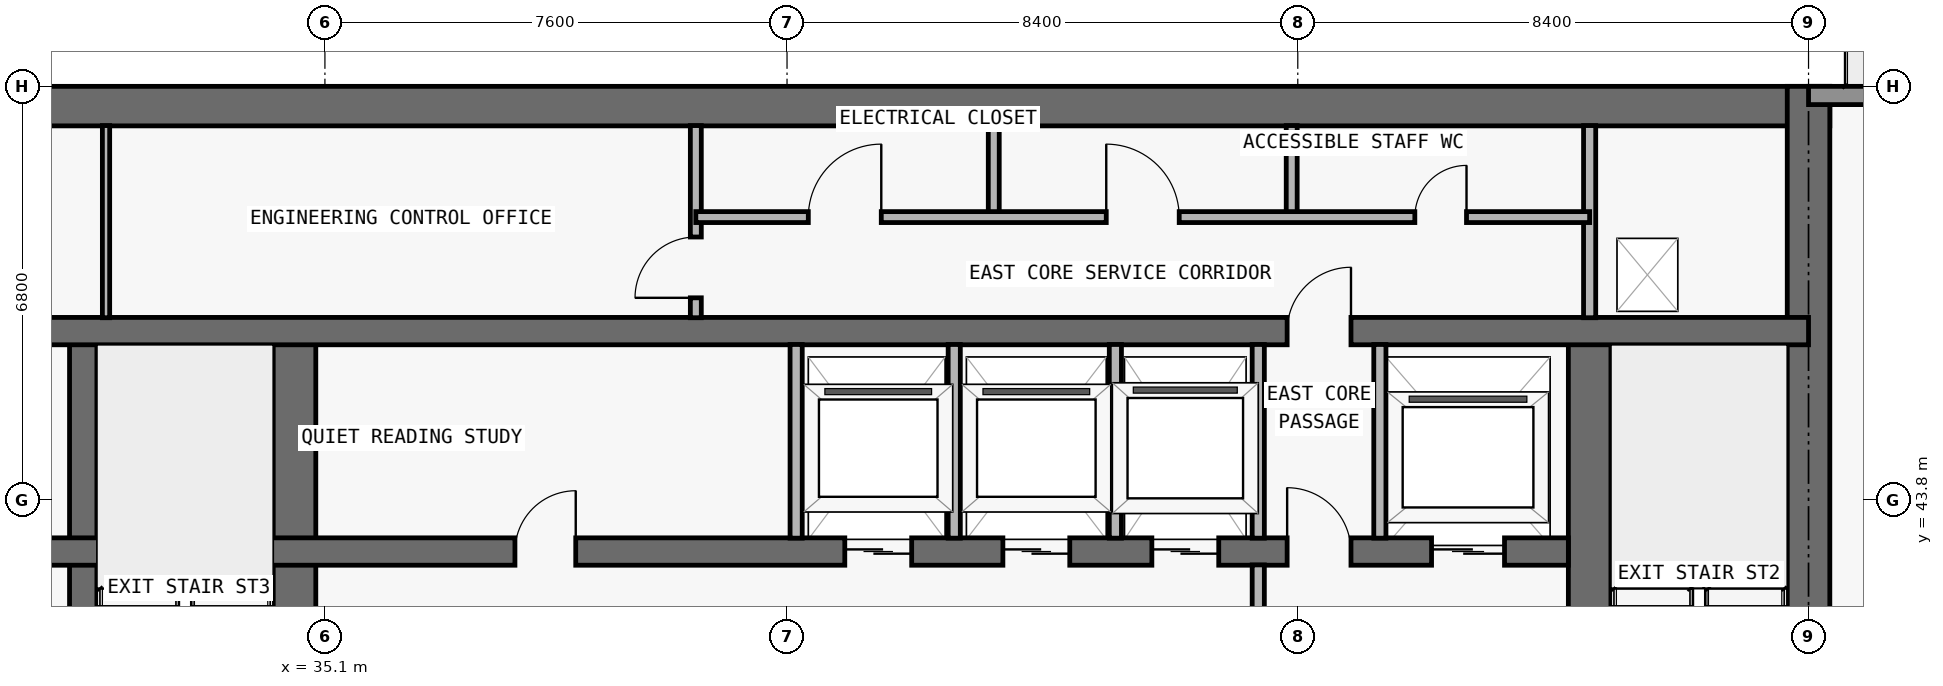
"""IFC4 building model, lengths in metres.
Left out: names, types, materials, properties, quantities, classifications, styles, units other than length and angle.
Written with IfcOpenShell. Run it as: python <this file> out.ifc"""

import sys

from ifc_helpers import new_model, si_unit, direction, frame, frame_2d, origin, place, context, subcontext, project, spatial, rectangle, extrude, element, fill, save


model = new_model("IFC4")
c1 = context("Model", 3, precision=1e-05, world=origin(), true_north=direction((0.0, 1.0)))
c2 = subcontext(c1, "Body", "Model", "MODEL_VIEW")
j1 = project(units=[si_unit("LENGTHUNIT", "METRE"), si_unit("PLANEANGLEUNIT", "RADIAN")], contexts=[c1])
p1 = place(None, origin())
s1 = spatial("IfcSite", under=j1, at=p1, CompositionType="ELEMENT")
p2 = place(p1, origin())
s2 = spatial("IfcBuilding", under=s1, at=p2, CompositionType="ELEMENT")
p3 = place(p2, frame((0.0, 0.0, 183.6)))
s3 = spatial("IfcBuildingStorey", under=s2, at=p3, CompositionType="ELEMENT", Elevation=183.6)
p4 = place(p3, frame((17.95, 50.275, 0.0), z_axis=(0.0, 0.0, 1.0), x_axis=(1.0, 0.0, 0.0)))
e1 = element("IfcWall", 1, at=p4, inside=s3, PredefinedType="SHEAR", context=c2, shape_type="SweptSolid", body=[
    extrude(rectangle(XDim=41.9, YDim=0.65, at=frame_2d((20.95, 0.0))), origin(), (0.0, 0.0, 1.0), 4.55),
])
p5 = place(p3, frame((59.5, 36.65, 0.0), z_axis=(0.0, 0.0, 1.0), x_axis=(0.0, 1.0, 0.0)))
e2 = element("IfcWall", 2, at=p5, inside=s3, PredefinedType="SHEAR", context=c2, shape_type="SweptSolid", body=[
    extrude(rectangle(XDim=13.95, YDim=0.7, at=frame_2d((6.975, 0.0))), origin(), (0.0, 0.0, 1.0), 4.55),
])
p6 = place(p3, frame((55.9, 37.0, 0.0), z_axis=(0.0, 0.0, 1.0), x_axis=(0.0, 1.0, 0.0)))
e3 = element("IfcWall", 3, at=p6, inside=s3, PredefinedType="SHEAR", context=c2, shape_type="SweptSolid", body=[
    extrude(rectangle(XDim=9.575, YDim=0.7, at=frame_2d((4.788, 0.0))), origin(), (0.0, 0.0, 1.0), 4.55),
])
p7 = place(p6, frame((0.55, 0.0, 0.0)))
e4 = element("IfcOpeningElement", 4, at=p7, cuts=e3, PredefinedType="OPENING", context=c2, shape_type="SweptSolid", body=[
    extrude(rectangle(XDim=1.1, YDim=2.15, at=frame_2d((0.55, 1.075))), frame((0.0, 0.36, 0.0), z_axis=(0.0, -1.0, 0.0), x_axis=(1.0, 0.0, 0.0)), (0.0, 0.0, 1.0), 0.72),
])
p8 = place(p3, frame((31.125, 37.0, 0.0), z_axis=(0.0, 0.0, 1.0), x_axis=(0.0, 1.0, 0.0)))
e5 = element("IfcWall", 5, at=p8, inside=s3, PredefinedType="SHEAR", context=c2, shape_type="SweptSolid", body=[
    extrude(rectangle(XDim=9.575, YDim=0.45, at=frame_2d((4.788, 0.0))), origin(), (0.0, 0.0, 1.0), 4.55),
])
p9 = place(p3, frame((34.6, 37.0, 0.0), z_axis=(0.0, 0.0, 1.0), x_axis=(0.0, 1.0, 0.0)))
e6 = element("IfcWall", 6, at=p9, inside=s3, PredefinedType="SHEAR", context=c2, shape_type="SweptSolid", body=[
    extrude(rectangle(XDim=9.575, YDim=0.7, at=frame_2d((4.788, 0.0))), origin(), (0.0, 0.0, 1.0), 4.55),
])
p10 = place(p3, frame((22.25, 42.95, 0.0), z_axis=(0.0, 0.0, 1.0), x_axis=(1.0, 0.0, 0.0)))
e7 = element("IfcWall", 7, at=p10, inside=s3, PredefinedType="SHEAR", context=c2, shape_type="SweptSolid", body=[
    extrude(rectangle(XDim=33.3, YDim=0.45, at=frame_2d((16.65, 0.0))), origin(), (0.0, 0.0, 1.0), 4.55),
])
p11 = place(p10, frame((1.05, 0.0, 0.0)))
e8 = element("IfcOpeningElement", 8, at=p11, cuts=e7, PredefinedType="OPENING", context=c2, shape_type="SweptSolid", body=[
    extrude(rectangle(XDim=1.2, YDim=2.2, at=frame_2d((0.6, 1.1))), frame((0.0, 0.235, 0.0), z_axis=(0.0, -1.0, 0.0), x_axis=(1.0, 0.0, 0.0)), (0.0, 0.0, 1.0), 0.47),
])
p12 = place(p10, frame((31.05, 0.0, 0.0)))
e9 = element("IfcOpeningElement", 9, at=p12, cuts=e7, PredefinedType="OPENING", context=c2, shape_type="SweptSolid", body=[
    extrude(rectangle(XDim=1.2, YDim=2.2, at=frame_2d((0.6, 1.1))), frame((0.0, 0.235, 0.0), z_axis=(0.0, -1.0, 0.0), x_axis=(1.0, 0.0, 0.0)), (0.0, 0.0, 1.0), 0.47),
])
p13 = place(p10, frame((21.4, 0.0, 0.0)))
e10 = element("IfcOpeningElement", 10, at=p13, cuts=e7, PredefinedType="OPENING", context=c2, shape_type="SweptSolid", body=[
    extrude(rectangle(XDim=1.1, YDim=2.2, at=frame_2d((0.55, 1.1))), frame((0.0, 0.235, 0.0), z_axis=(0.0, -1.0, 0.0), x_axis=(1.0, 0.0, 0.0)), (0.0, 0.0, 1.0), 0.47),
])
p14 = place(p10, frame((24.0, 0.0, 0.0)))
e11 = element("IfcOpeningElement", 11, at=p14, cuts=e7, PredefinedType="OPENING", context=c2, shape_type="SweptSolid", body=[
    extrude(rectangle(XDim=1.1, YDim=2.2, at=frame_2d((0.55, 1.1))), frame((0.0, 0.235, 0.0), z_axis=(0.0, -1.0, 0.0), x_axis=(1.0, 0.0, 0.0)), (0.0, 0.0, 1.0), 0.47),
])
p15 = place(p10, frame((26.45, 0.0, 0.0)))
e12 = element("IfcOpeningElement", 12, at=p15, cuts=e7, PredefinedType="OPENING", context=c2, shape_type="SweptSolid", body=[
    extrude(rectangle(XDim=1.1, YDim=2.2, at=frame_2d((0.55, 1.1))), frame((0.0, 0.235, 0.0), z_axis=(0.0, -1.0, 0.0), x_axis=(1.0, 0.0, 0.0)), (0.0, 0.0, 1.0), 0.47),
])
p16 = place(p10, frame((5.95, 0.0, 0.0)))
e13 = element("IfcOpeningElement", 13, at=p16, cuts=e7, PredefinedType="OPENING", context=c2, shape_type="SweptSolid", body=[
    extrude(rectangle(XDim=1.1, YDim=2.2, at=frame_2d((0.55, 1.1))), frame((0.0, 0.235, 0.0), z_axis=(0.0, -1.0, 0.0), x_axis=(1.0, 0.0, 0.0)), (0.0, 0.0, 1.0), 0.47),
])
p17 = place(p10, frame((3.625, 0.0, 0.0)))
e14 = element("IfcOpeningElement", 14, at=p17, cuts=e7, PredefinedType="OPENING", context=c2, shape_type="SweptSolid", body=[
    extrude(rectangle(XDim=1.05, YDim=2.15, at=frame_2d((0.525, 1.075))), frame((0.0, 0.235, 0.0), z_axis=(0.0, -1.0, 0.0), x_axis=(1.0, 0.0, 0.0)), (0.0, 0.0, 1.0), 0.47),
])
p18 = place(p10, frame((28.675, 0.0, 0.0)))
e15 = element("IfcOpeningElement", 15, at=p18, cuts=e7, PredefinedType="OPENING", context=c2, shape_type="SweptSolid", body=[
    extrude(rectangle(XDim=1.05, YDim=2.15, at=frame_2d((0.525, 1.075))), frame((0.0, 0.235, 0.0), z_axis=(0.0, -1.0, 0.0), x_axis=(1.0, 0.0, 0.0)), (0.0, 0.0, 1.0), 0.47),
])
p19 = place(p10, frame((15.975, 0.0, 0.0)))
e16 = element("IfcOpeningElement", 16, at=p19, cuts=e7, PredefinedType="OPENING", context=c2, shape_type="SweptSolid", body=[
    extrude(rectangle(XDim=1.0, YDim=2.2, at=frame_2d((0.5, 1.1))), frame((0.0, 0.235, 0.0), z_axis=(0.0, -1.0, 0.0), x_axis=(1.0, 0.0, 0.0)), (0.0, 0.0, 1.0), 0.47),
])
p20 = place(p3, frame((18.3, 46.575, 0.0), z_axis=(0.0, 0.0, 1.0), x_axis=(1.0, 0.0, 0.0)))
e17 = element("IfcWall", 17, at=p20, inside=s3, PredefinedType="SHEAR", context=c2, shape_type="SweptSolid", body=[
    extrude(rectangle(XDim=41.2, YDim=0.45, at=frame_2d((20.6, 0.0))), origin(), (0.0, 0.0, 1.0), 4.55),
])
p21 = place(p20, frame((7.6, 0.0, 0.0)))
e18 = element("IfcOpeningElement", 18, at=p21, cuts=e17, PredefinedType="OPENING", context=c2, shape_type="SweptSolid", body=[
    extrude(rectangle(XDim=1.0, YDim=2.2, at=frame_2d((0.5, 1.1))), frame((0.0, 0.235, 0.0), z_axis=(0.0, -1.0, 0.0), x_axis=(1.0, 0.0, 0.0)), (0.0, 0.0, 1.0), 0.47),
])
p22 = place(p20, frame((32.625, 0.0, 0.0)))
e19 = element("IfcOpeningElement", 19, at=p22, cuts=e17, PredefinedType="OPENING", context=c2, shape_type="SweptSolid", body=[
    extrude(rectangle(XDim=1.05, YDim=2.15, at=frame_2d((0.525, 1.075))), frame((0.0, 0.235, 0.0), z_axis=(0.0, -1.0, 0.0), x_axis=(1.0, 0.0, 0.0)), (0.0, 0.0, 1.0), 0.47),
])
p23 = place(p3, frame((59.5, 50.45, 0.0), z_axis=(0.0, 0.0, 1.0), x_axis=(1.0, 0.0, 0.0)))
e20 = element("IfcWall", 20, at=p23, inside=s3, PredefinedType="STANDARD", context=c2, shape_type="SweptSolid", body=[
    extrude(rectangle(XDim=8.2, YDim=0.3, at=frame_2d((4.1, 0.0))), origin(), (0.0, 0.0, 1.0), 4.55),
])
p24 = place(p23, frame((3.1, 0.0, 0.0)))
e21 = element("IfcOpeningElement", 21, at=p24, cuts=e20, PredefinedType="OPENING", context=c2, shape_type="SweptSolid", body=[
    extrude(rectangle(XDim=2.0, YDim=2.3, at=frame_2d((1.0, 1.15))), frame((0.0, 0.16, 0.0), z_axis=(0.0, -1.0, 0.0), x_axis=(1.0, 0.0, 0.0)), (0.0, 0.0, 1.0), 0.32),
])
p25 = place(p3, frame((31.5, 46.795, 0.0), z_axis=(0.0, 0.0, 1.0), x_axis=(0.0, 1.0, 0.0)))
e22 = element("IfcWall", 22, at=p25, inside=s3, PredefinedType="PARTITIONING", context=c2, shape_type="SweptSolid", body=[
    extrude(rectangle(XDim=3.16, YDim=0.12, at=frame_2d((1.58, 0.0))), origin(), (0.0, 0.0, 1.0), 4.55),
])
p26 = place(p3, frame((41.2, 46.795, 0.0), z_axis=(0.0, 0.0, 1.0), x_axis=(0.0, 1.0, 0.0)))
e23 = element("IfcWall", 23, at=p26, inside=s3, PredefinedType="PARTITIONING", context=c2, shape_type="SweptSolid", body=[
    extrude(rectangle(XDim=3.16, YDim=0.18, at=frame_2d((1.58, 0.0))), origin(), (0.0, 0.0, 1.0), 4.55),
])
p27 = place(p26, frame((0.327, 0.0, 0.0)))
e24 = element("IfcOpeningElement", 24, at=p27, cuts=e23, PredefinedType="OPENING", context=c2, shape_type="SweptSolid", body=[
    extrude(rectangle(XDim=1.0, YDim=2.2, at=frame_2d((0.5, 1.1))), frame((0.0, 0.1, 0.0), z_axis=(0.0, -1.0, 0.0), x_axis=(1.0, 0.0, 0.0)), (0.0, 0.0, 1.0), 0.2),
])
for number, where, z_axis, x_axis in (
    (25, (42.85, 43.17, 0.0), (0.0, 0.0, 1.0), (0.0, 1.0, 0.0)),
    (26, (45.45, 43.17, 0.0), (0.0, 0.0, 1.0), (0.0, 1.0, 0.0)),
):
    element("IfcWall", number, at=place(p3, frame(where, z_axis=z_axis, x_axis=x_axis)), inside=s3, PredefinedType="PARTITIONING", context=c2, shape_type="SweptSolid", body=[
        extrude(rectangle(XDim=3.185, YDim=0.2, at=frame_2d((1.593, 0.0))), origin(), (0.0, 0.0, 1.0), 4.55),
    ])
p28 = place(p3, frame((46.1, 48.45, 0.0), z_axis=(0.0, 0.0, 1.0), x_axis=(0.0, 1.0, 0.0)))
e27 = element("IfcWall", 27, at=p28, inside=s3, PredefinedType="PARTITIONING", context=c2, shape_type="SweptSolid", body=[
    extrude(rectangle(XDim=1.505, YDim=0.18, at=frame_2d((0.752, 0.0))), origin(), (0.0, 0.0, 1.0), 4.55),
])
p29 = place(p3, frame((48.1, 43.17, 0.0), z_axis=(0.0, 0.0, 1.0), x_axis=(0.0, 1.0, 0.0)))
e28 = element("IfcWall", 28, at=p29, inside=s3, PredefinedType="PARTITIONING", context=c2, shape_type="SweptSolid", body=[
    extrude(rectangle(XDim=3.185, YDim=0.2, at=frame_2d((1.593, 0.0))), origin(), (0.0, 0.0, 1.0), 4.55),
])
p30 = place(p3, frame((50.45, 37.345, 0.0), z_axis=(0.0, 0.0, 1.0), x_axis=(0.0, 1.0, 0.0)))
e29 = element("IfcWall", 29, at=p30, inside=s3, PredefinedType="PARTITIONING", context=c2, shape_type="SweptSolid", body=[
    extrude(rectangle(XDim=5.385, YDim=0.2, at=frame_2d((2.692, 0.0))), origin(), (0.0, 0.0, 1.0), 4.55),
])
p31 = place(p3, frame((50.45, 43.17, 0.0), z_axis=(0.0, 0.0, 1.0), x_axis=(0.0, 1.0, 0.0)))
e30 = element("IfcWall", 30, at=p31, inside=s3, PredefinedType="PARTITIONING", context=c2, shape_type="SweptSolid", body=[
    extrude(rectangle(XDim=3.185, YDim=0.2, at=frame_2d((1.593, 0.0))), origin(), (0.0, 0.0, 1.0), 4.55),
])
p32 = place(p3, frame((51.0, 48.45, 0.0), z_axis=(0.0, 0.0, 1.0), x_axis=(0.0, 1.0, 0.0)))
e31 = element("IfcWall", 31, at=p32, inside=s3, PredefinedType="PARTITIONING", context=c2, shape_type="SweptSolid", body=[
    extrude(rectangle(XDim=1.505, YDim=0.18, at=frame_2d((0.752, 0.0))), origin(), (0.0, 0.0, 1.0), 4.55),
])
p33 = place(p3, frame((52.45, 43.17, 0.0), z_axis=(0.0, 0.0, 1.0), x_axis=(0.0, 1.0, 0.0)))
e32 = element("IfcWall", 32, at=p33, inside=s3, PredefinedType="PARTITIONING", context=c2, shape_type="SweptSolid", body=[
    extrude(rectangle(XDim=3.185, YDim=0.2, at=frame_2d((1.593, 0.0))), origin(), (0.0, 0.0, 1.0), 4.55),
])
p34 = place(p3, frame((55.9, 46.795, 0.0), z_axis=(0.0, 0.0, 1.0), x_axis=(0.0, 1.0, 0.0)))
e33 = element("IfcWall", 33, at=p34, inside=s3, PredefinedType="PARTITIONING", context=c2, shape_type="SweptSolid", body=[
    extrude(rectangle(XDim=3.16, YDim=0.2, at=frame_2d((1.58, 0.0))), origin(), (0.0, 0.0, 1.0), 4.55),
])
p35 = place(p3, frame((41.2, 48.45, 0.0), z_axis=(0.0, 0.0, 1.0), x_axis=(1.0, 0.0, 0.0)))
e34 = element("IfcWall", 34, at=p35, inside=s3, PredefinedType="PARTITIONING", context=c2, shape_type="SweptSolid", body=[
    extrude(rectangle(XDim=14.7, YDim=0.18, at=frame_2d((7.35, 0.0))), origin(), (0.0, 0.0, 1.0), 4.55),
])
p36 = place(p35, frame((1.85, 0.0, 0.0)))
e35 = element("IfcOpeningElement", 35, at=p36, cuts=e34, PredefinedType="OPENING", context=c2, shape_type="SweptSolid", body=[
    extrude(rectangle(XDim=1.2, YDim=2.2, at=frame_2d((0.6, 1.1))), frame((0.0, 0.1, 0.0), z_axis=(0.0, -1.0, 0.0), x_axis=(1.0, 0.0, 0.0)), (0.0, 0.0, 1.0), 0.2),
])
p37 = place(p35, frame((6.75, 0.0, 0.0)))
e36 = element("IfcOpeningElement", 36, at=p37, cuts=e34, PredefinedType="OPENING", context=c2, shape_type="SweptSolid", body=[
    extrude(rectangle(XDim=1.2, YDim=2.2, at=frame_2d((0.6, 1.1))), frame((0.0, 0.1, 0.0), z_axis=(0.0, -1.0, 0.0), x_axis=(1.0, 0.0, 0.0)), (0.0, 0.0, 1.0), 0.2),
])
p38 = place(p35, frame((11.825, 0.0, 0.0)))
e37 = element("IfcOpeningElement", 37, at=p38, cuts=e34, PredefinedType="OPENING", context=c2, shape_type="SweptSolid", body=[
    extrude(rectangle(XDim=0.85, YDim=2.1, at=frame_2d((0.425, 1.05))), frame((0.0, 0.1, 0.0), z_axis=(0.0, -1.0, 0.0), x_axis=(1.0, 0.0, 0.0)), (0.0, 0.0, 1.0), 0.2),
])
p39 = place(p12, origin())
e38 = element("IfcDoor", 38, at=p39, inside=s3, OperationType="DOUBLE_DOOR_SLIDING", PredefinedType="DOOR", context=c2, shape_type="SweptSolid", body=[
    extrude(rectangle(XDim=1.2, YDim=2.2, at=frame_2d((0.6, 1.1))), frame((0.0, 0.025, 0.0), z_axis=(0.0, -1.0, 0.0), x_axis=(1.0, 0.0, 0.0)), (0.0, 0.0, 1.0), 0.05),
])
fill(e9, e38)
p40 = place(p13, origin())
e39 = element("IfcDoor", 39, at=p40, inside=s3, OperationType="DOUBLE_DOOR_SLIDING", PredefinedType="DOOR", context=c2, shape_type="SweptSolid", body=[
    extrude(rectangle(XDim=1.1, YDim=2.2, at=frame_2d((0.55, 1.1))), frame((0.0, 0.025, 0.0), z_axis=(0.0, -1.0, 0.0), x_axis=(1.0, 0.0, 0.0)), (0.0, 0.0, 1.0), 0.05),
])
fill(e10, e39)
p41 = place(p14, origin())
e40 = element("IfcDoor", 40, at=p41, inside=s3, OperationType="DOUBLE_DOOR_SLIDING", PredefinedType="DOOR", context=c2, shape_type="SweptSolid", body=[
    extrude(rectangle(XDim=1.1, YDim=2.2, at=frame_2d((0.55, 1.1))), frame((0.0, 0.025, 0.0), z_axis=(0.0, -1.0, 0.0), x_axis=(1.0, 0.0, 0.0)), (0.0, 0.0, 1.0), 0.05),
])
fill(e11, e40)
p42 = place(p15, origin())
e41 = element("IfcDoor", 41, at=p42, inside=s3, OperationType="DOUBLE_DOOR_SLIDING", PredefinedType="DOOR", context=c2, shape_type="SweptSolid", body=[
    extrude(rectangle(XDim=1.1, YDim=2.2, at=frame_2d((0.55, 1.1))), frame((0.0, 0.025, 0.0), z_axis=(0.0, -1.0, 0.0), x_axis=(1.0, 0.0, 0.0)), (0.0, 0.0, 1.0), 0.05),
])
fill(e12, e41)
p43 = place(p18, origin())
e42 = element("IfcDoor", 42, at=p43, inside=s3, OperationType="SINGLE_SWING_LEFT", PredefinedType="DOOR", context=c2, shape_type="SweptSolid", body=[
    extrude(rectangle(XDim=1.05, YDim=2.15, at=frame_2d((0.525, 1.075))), frame((0.0, 0.025, 0.0), z_axis=(0.0, -1.0, 0.0), x_axis=(1.0, 0.0, 0.0)), (0.0, 0.0, 1.0), 0.05),
])
fill(e15, e42)
p44 = place(p19, origin())
e43 = element("IfcDoor", 43, at=p44, inside=s3, OperationType="SINGLE_SWING_RIGHT", PredefinedType="DOOR", context=c2, shape_type="SweptSolid", body=[
    extrude(rectangle(XDim=1.0, YDim=2.2, at=frame_2d((0.5, 1.1))), frame((0.0, 0.025, 0.0), z_axis=(0.0, -1.0, 0.0), x_axis=(1.0, 0.0, 0.0)), (0.0, 0.0, 1.0), 0.05),
])
fill(e16, e43)
p45 = place(p22, origin())
e44 = element("IfcDoor", 44, at=p45, inside=s3, OperationType="SINGLE_SWING_RIGHT", PredefinedType="DOOR", context=c2, shape_type="SweptSolid", body=[
    extrude(rectangle(XDim=1.05, YDim=2.15, at=frame_2d((0.525, 1.075))), frame((0.0, 0.025, 0.0), z_axis=(0.0, -1.0, 0.0), x_axis=(1.0, 0.0, 0.0)), (0.0, 0.0, 1.0), 0.05),
])
fill(e19, e44)
p46 = place(p27, origin())
e45 = element("IfcDoor", 45, at=p46, inside=s3, OperationType="SINGLE_SWING_LEFT", PredefinedType="DOOR", context=c2, shape_type="SweptSolid", body=[
    extrude(rectangle(XDim=1.0, YDim=2.2, at=frame_2d((0.5, 1.1))), frame((0.0, 0.025, 0.0), z_axis=(0.0, -1.0, 0.0), x_axis=(1.0, 0.0, 0.0)), (0.0, 0.0, 1.0), 0.05),
])
fill(e24, e45)
p47 = place(p36, origin())
e46 = element("IfcDoor", 46, at=p47, inside=s3, OperationType="SINGLE_SWING_RIGHT", PredefinedType="DOOR", context=c2, shape_type="SweptSolid", body=[
    extrude(rectangle(XDim=1.2, YDim=2.2, at=frame_2d((0.6, 1.1))), frame((0.0, 0.025, 0.0), z_axis=(0.0, -1.0, 0.0), x_axis=(1.0, 0.0, 0.0)), (0.0, 0.0, 1.0), 0.05),
])
fill(e35, e46)
p48 = place(p37, origin())
e47 = element("IfcDoor", 47, at=p48, inside=s3, OperationType="SINGLE_SWING_LEFT", PredefinedType="DOOR", context=c2, shape_type="SweptSolid", body=[
    extrude(rectangle(XDim=1.2, YDim=2.2, at=frame_2d((0.6, 1.1))), frame((0.0, 0.025, 0.0), z_axis=(0.0, -1.0, 0.0), x_axis=(1.0, 0.0, 0.0)), (0.0, 0.0, 1.0), 0.05),
])
fill(e36, e47)
p49 = place(p38, origin())
e48 = element("IfcDoor", 48, at=p49, inside=s3, OperationType="SINGLE_SWING_RIGHT", PredefinedType="DOOR", context=c2, shape_type="SweptSolid", body=[
    extrude(rectangle(XDim=0.85, YDim=2.1, at=frame_2d((0.425, 1.05))), frame((0.0, 0.025, 0.0), z_axis=(0.0, -1.0, 0.0), x_axis=(1.0, 0.0, 0.0)), (0.0, 0.0, 1.0), 0.05),
])
fill(e37, e48)
save(model, sys.argv[1])
